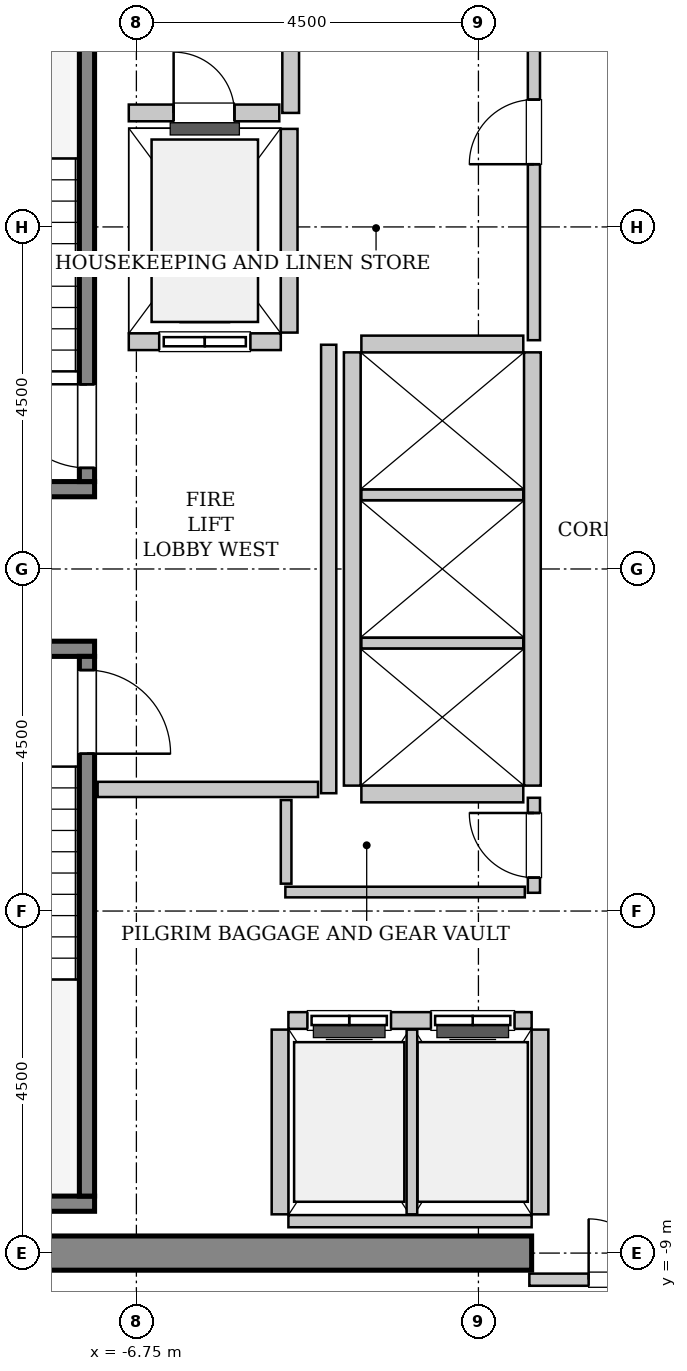
"""IFC4 building model, lengths in metres.
Left out: names, types, materials, properties, quantities, classifications, styles, units other than length and angle.
Written with IfcOpenShell. Run it as: python <this file> out.ifc"""

import sys

from ifc_helpers import new_model, si_unit, direction, frame, frame_2d, origin, place, context, subcontext, project, spatial, rectangle, extrude, source, transform, mapped, element, fill, save


model = new_model("IFC4")
c1 = context("Model", 3, precision=1e-05, world=origin(), true_north=direction((0.0, 1.0)))
c2 = subcontext(c1, "Body", "Model", "MODEL_VIEW")
j1 = project(units=[si_unit("LENGTHUNIT", "METRE"), si_unit("PLANEANGLEUNIT", "RADIAN")], contexts=[c1])
p1 = place(None, origin())
s1 = spatial("IfcSite", under=j1, at=p1, CompositionType="ELEMENT")
p2 = place(p1, origin())
s2 = spatial("IfcBuilding", under=s1, at=p2, CompositionType="ELEMENT")
p3 = place(p2, frame((0.0, 0.0, 210.4)))
s3 = spatial("IfcBuildingStorey", under=s2, at=p3, CompositionType="ELEMENT", Elevation=210.4)
m1 = source(origin(), c2, "Body", "SweptSolid", [
    extrude(rectangle(XDim=9.925, YDim=0.45, at=frame_2d((4.962, 0.0))), origin(), (0.0, 0.0, 1.0), 3.8),
])
p4 = place(p3, frame((-11.475, -9.0, 0.0), z_axis=(0.0, 0.0, 1.0), x_axis=(1.0, 0.0, 0.0)))
e1 = element("IfcWall", 1, at=p4, inside=s3, PredefinedType="SHEAR", context=c2, shape_type="MappedRepresentation", body=[
    mapped(m1, transform((0.0, 0.0, 0.0), x_axis=(1.0, 0.0, 0.0), y_axis=(0.0, 1.0, 0.0), z_axis=(0.0, 0.0, 1.0), scale=1.0)),
])
m2 = source(origin(), c2, "Body", "SweptSolid", [
    extrude(rectangle(XDim=3.4, YDim=0.2, at=frame_2d((1.7, 0.0))), origin(), (0.0, 0.0, 1.0), 3.8),
])
p5 = place(p3, frame((-7.3, 1.05, 0.0), z_axis=(0.0, 0.0, 1.0), x_axis=(-1.0, 0.0, 0.0)))
e2 = element("IfcWall", 2, at=p5, inside=s3, PredefinedType="SOLIDWALL", context=c2, shape_type="MappedRepresentation", body=[
    mapped(m2, transform((0.0, 0.0, 0.0), x_axis=(1.0, 0.0, 0.0), y_axis=(0.0, 1.0, 0.0), z_axis=(0.0, 0.0, 1.0), scale=1.0)),
])
m3 = source(origin(), c2, "Body", "SweptSolid", [
    extrude(rectangle(XDim=7.1, YDim=0.2, at=frame_2d((3.55, 0.0))), origin(), (0.0, 0.0, 1.0), 3.8),
])
p6 = place(p3, frame((-7.4, 1.15, 0.0), z_axis=(0.0, 0.0, 1.0), x_axis=(0.0, 1.0, 0.0)))
e3 = element("IfcWall", 3, at=p6, inside=s3, PredefinedType="SOLIDWALL", context=c2, shape_type="MappedRepresentation", body=[
    mapped(m3, transform((0.0, 0.0, 0.0), x_axis=(1.0, 0.0, 0.0), y_axis=(0.0, 1.0, 0.0), z_axis=(0.0, 0.0, 1.0), scale=1.0)),
])
p7 = place(p6, frame((0.18, 0.0, 0.0)))
e4 = element("IfcOpeningElement", 4, at=p7, cuts=e3, PredefinedType="OPENING", context=c2, shape_type="SweptSolid", body=[
    extrude(rectangle(XDim=1.1, YDim=2.15, at=frame_2d((0.55, 1.075))), frame((0.0, 0.11, 0.0), z_axis=(0.0, -1.0, 0.0), x_axis=(1.0, 0.0, 0.0)), (0.0, 0.0, 1.0), 0.22),
])
p8 = place(p3, frame((-10.7, -1.05, 0.0), z_axis=(0.0, 0.0, 1.0), x_axis=(1.0, 0.0, 0.0)))
e5 = element("IfcWall", 5, at=p8, inside=s3, PredefinedType="SOLIDWALL", context=c2, shape_type="MappedRepresentation", body=[
    mapped(m2, transform((0.0, 0.0, 0.0), x_axis=(1.0, 0.0, 0.0), y_axis=(0.0, 1.0, 0.0), z_axis=(0.0, 0.0, 1.0), scale=1.0)),
])
m4 = source(origin(), c2, "Body", "SweptSolid", [
    extrude(rectangle(XDim=3.73, YDim=0.2, at=frame_2d((1.865, 0.0))), origin(), (0.0, 0.0, 1.0), 3.8),
])
p9 = place(p3, frame((-11.03, -8.35, 0.0), z_axis=(0.0, 0.0, 1.0), x_axis=(1.0, 0.0, 0.0)))
e6 = element("IfcWall", 6, at=p9, inside=s3, PredefinedType="SOLIDWALL", context=c2, shape_type="MappedRepresentation", body=[
    mapped(m4, transform((0.0, 0.0, 0.0), x_axis=(1.0, 0.0, 0.0), y_axis=(0.0, 1.0, 0.0), z_axis=(0.0, 0.0, 1.0), scale=1.0)),
])
p10 = place(p3, frame((-7.4, -1.15, 0.0), z_axis=(0.0, 0.0, 1.0), x_axis=(0.0, -1.0, 0.0)))
e7 = element("IfcWall", 7, at=p10, inside=s3, PredefinedType="SOLIDWALL", context=c2, shape_type="MappedRepresentation", body=[
    mapped(m3, transform((0.0, 0.0, 0.0), x_axis=(1.0, 0.0, 0.0), y_axis=(0.0, 1.0, 0.0), z_axis=(0.0, 0.0, 1.0), scale=1.0)),
])
p11 = place(p10, frame((0.18, 0.0, 0.0)))
e8 = element("IfcOpeningElement", 8, at=p11, cuts=e7, PredefinedType="OPENING", context=c2, shape_type="SweptSolid", body=[
    extrude(rectangle(XDim=1.1, YDim=2.15, at=frame_2d((0.55, 1.075))), frame((0.0, 0.11, 0.0), z_axis=(0.0, -1.0, 0.0), x_axis=(1.0, 0.0, 0.0)), (0.0, 0.0, 1.0), 0.22),
])
m5 = source(origin(), c2, "Body", "SweptSolid", [
    extrude(rectangle(XDim=2.0, YDim=0.22, at=frame_2d((1.0, 0.0))), origin(), (0.0, 0.0, 1.0), 3.535),
])
p12 = place(p3, frame((-6.85, 2.99, 0.0), z_axis=(0.0, 0.0, 1.0), x_axis=(1.0, 0.0, 0.0)))
e9 = element("IfcWall", 9, at=p12, inside=s3, PredefinedType="SOLIDWALL", context=c2, shape_type="MappedRepresentation", body=[
    mapped(m5, transform((0.0, 0.0, 0.0), x_axis=(1.0, 0.0, 0.0), y_axis=(0.0, 1.0, 0.0), z_axis=(0.0, 0.0, 1.0), scale=1.0)),
])
p13 = place(p12, frame((0.4, 0.0, 0.0)))
e10 = element("IfcOpeningElement", 10, at=p13, cuts=e9, PredefinedType="OPENING", context=c2, shape_type="SweptSolid", body=[
    extrude(rectangle(XDim=1.2, YDim=2.2, at=frame_2d((0.6, 1.1))), frame((0.0, 0.12, 0.0), z_axis=(0.0, -1.0, 0.0), x_axis=(1.0, 0.0, 0.0)), (0.0, 0.0, 1.0), 0.24),
])
m6 = source(origin(), c2, "Body", "SweptSolid", [
    extrude(rectangle(XDim=2.68, YDim=0.22, at=frame_2d((1.34, 0.0))), origin(), (0.0, 0.0, 1.0), 3.535),
])
p14 = place(p3, frame((-4.74, 3.11, 0.0), z_axis=(0.0, 0.0, 1.0), x_axis=(0.0, 1.0, 0.0)))
e11 = element("IfcWall", 11, at=p14, inside=s3, PredefinedType="SOLIDWALL", context=c2, shape_type="MappedRepresentation", body=[
    mapped(m6, transform((0.0, 0.0, 0.0), x_axis=(1.0, 0.0, 0.0), y_axis=(0.0, 1.0, 0.0), z_axis=(0.0, 0.0, 1.0), scale=1.0)),
])
m7 = source(origin(), c2, "Body", "SweptSolid", [
    extrude(rectangle(XDim=3.2, YDim=0.22, at=frame_2d((1.6, 0.0))), origin(), (0.0, 0.0, 1.0), 3.535),
])
p15 = place(p3, frame((-1.55, -5.94, 0.0), z_axis=(0.0, 0.0, 1.0), x_axis=(-1.0, 0.0, 0.0)))
e12 = element("IfcWall", 12, at=p15, inside=s3, PredefinedType="SOLIDWALL", context=c2, shape_type="MappedRepresentation", body=[
    mapped(m7, transform((0.0, 0.0, 0.0), x_axis=(1.0, 0.0, 0.0), y_axis=(0.0, 1.0, 0.0), z_axis=(0.0, 0.0, 1.0), scale=1.0)),
])
p16 = place(p15, frame((1.85, 0.0, 0.0)))
e13 = element("IfcOpeningElement", 13, at=p16, cuts=e12, PredefinedType="OPENING", context=c2, shape_type="SweptSolid", body=[
    extrude(rectangle(XDim=1.1, YDim=2.2, at=frame_2d((0.55, 1.1))), frame((0.0, 0.12, 0.0), z_axis=(0.0, -1.0, 0.0), x_axis=(1.0, 0.0, 0.0)), (0.0, 0.0, 1.0), 0.24),
])
p17 = place(p15, frame((0.225, 0.0, 0.0)))
e14 = element("IfcOpeningElement", 14, at=p17, cuts=e12, PredefinedType="OPENING", context=c2, shape_type="SweptSolid", body=[
    extrude(rectangle(XDim=1.1, YDim=2.2, at=frame_2d((0.55, 1.1))), frame((0.0, 0.12, 0.0), z_axis=(0.0, -1.0, 0.0), x_axis=(1.0, 0.0, 0.0)), (0.0, 0.0, 1.0), 0.24),
])
m8 = source(origin(), c2, "Body", "SweptSolid", [
    extrude(rectangle(XDim=3.2, YDim=0.16, at=frame_2d((1.6, 0.0))), origin(), (0.0, 0.0, 1.0), 2.625),
])
p18 = place(p3, frame((-4.75, -8.58, 0.0), z_axis=(0.0, 0.0, 1.0), x_axis=(1.0, 0.0, 0.0)))
e15 = element("IfcWall", 15, at=p18, inside=s3, PredefinedType="PARTITIONING", context=c2, shape_type="MappedRepresentation", body=[
    mapped(m8, transform((0.0, 0.0, 0.0), x_axis=(1.0, 0.0, 0.0), y_axis=(0.0, 1.0, 0.0), z_axis=(0.0, 0.0, 1.0), scale=1.0)),
])
m9 = source(origin(), c2, "Body", "SweptSolid", [
    extrude(rectangle(XDim=2.43, YDim=0.22, at=frame_2d((1.215, 0.0))), origin(), (0.0, 0.0, 1.0), 3.535),
])
p19 = place(p3, frame((-4.86, -6.06, 0.0), z_axis=(0.0, 0.0, 1.0), x_axis=(0.0, -1.0, 0.0)))
e16 = element("IfcWall", 16, at=p19, inside=s3, PredefinedType="SOLIDWALL", context=c2, shape_type="MappedRepresentation", body=[
    mapped(m9, transform((0.0, 0.0, 0.0), x_axis=(1.0, 0.0, 0.0), y_axis=(0.0, 1.0, 0.0), z_axis=(0.0, 0.0, 1.0), scale=1.0)),
])
m10 = source(origin(), c2, "Body", "SweptSolid", [
    extrude(rectangle(XDim=2.43, YDim=0.14, at=frame_2d((1.215, 0.0))), origin(), (0.0, 0.0, 1.0), 3.535),
])
p20 = place(p3, frame((-3.125, -8.49, 0.0), z_axis=(0.0, 0.0, 1.0), x_axis=(0.0, 1.0, 0.0)))
e17 = element("IfcWall", 17, at=p20, inside=s3, PredefinedType="PARTITIONING", context=c2, shape_type="MappedRepresentation", body=[
    mapped(m10, transform((0.0, 0.0, 0.0), x_axis=(1.0, 0.0, 0.0), y_axis=(0.0, 1.0, 0.0), z_axis=(0.0, 0.0, 1.0), scale=1.0)),
])
p21 = place(p3, frame((-1.44, -8.49, 0.0), z_axis=(0.0, 0.0, 1.0), x_axis=(0.0, 1.0, 0.0)))
e18 = element("IfcWall", 18, at=p21, inside=s3, PredefinedType="SOLIDWALL", context=c2, shape_type="MappedRepresentation", body=[
    mapped(m9, transform((0.0, 0.0, 0.0), x_axis=(1.0, 0.0, 0.0), y_axis=(0.0, 1.0, 0.0), z_axis=(0.0, 0.0, 1.0), scale=1.0)),
])
m11 = source(origin(), c2, "Body", "SweptSolid", [
    extrude(rectangle(XDim=5.7, YDim=0.22, at=frame_2d((2.85, 0.0))), origin(), (0.0, 0.0, 1.0), 3.535),
])
for number, where, z_axis, x_axis in (
    (19, (-1.54, -2.85, 0.0), (0.0, 0.0, 1.0), (0.0, 1.0, 0.0)),
    (20, (-3.91, 2.85, 0.0), (0.0, 0.0, 1.0), (0.0, -1.0, 0.0)),
):
    element("IfcWall", number, at=place(p3, frame(where, z_axis=z_axis, x_axis=x_axis)), inside=s3, PredefinedType="SOLIDWALL", context=c2, shape_type="MappedRepresentation", body=[
        mapped(m11, transform((0.0, 0.0, 0.0), x_axis=(1.0, 0.0, 0.0), y_axis=(0.0, 1.0, 0.0), z_axis=(0.0, 0.0, 1.0), scale=1.0)),
    ])
m12 = source(origin(), c2, "Body", "SweptSolid", [
    extrude(rectangle(XDim=2.13, YDim=0.22, at=frame_2d((1.065, 0.0))), origin(), (0.0, 0.0, 1.0), 3.535),
])
p22 = place(p3, frame((-3.79, -2.96, 0.0), z_axis=(0.0, 0.0, 1.0), x_axis=(1.0, 0.0, 0.0)))
e21 = element("IfcWall", 21, at=p22, inside=s3, PredefinedType="SOLIDWALL", context=c2, shape_type="MappedRepresentation", body=[
    mapped(m12, transform((0.0, 0.0, 0.0), x_axis=(1.0, 0.0, 0.0), y_axis=(0.0, 1.0, 0.0), z_axis=(0.0, 0.0, 1.0), scale=1.0)),
])
m13 = source(origin(), c2, "Body", "SweptSolid", [
    extrude(rectangle(XDim=2.13, YDim=0.14, at=frame_2d((1.065, 0.0))), origin(), (0.0, 0.0, 1.0), 3.535),
])
for number, where, z_axis, x_axis in (
    (22, (-3.79, -0.975, 0.0), (0.0, 0.0, 1.0), (1.0, 0.0, 0.0)),
    (23, (-3.79, 0.975, 0.0), (0.0, 0.0, 1.0), (1.0, 0.0, 0.0)),
):
    element("IfcWall", number, at=place(p3, frame(where, z_axis=z_axis, x_axis=x_axis)), inside=s3, PredefinedType="PARTITIONING", context=c2, shape_type="MappedRepresentation", body=[
        mapped(m13, transform((0.0, 0.0, 0.0), x_axis=(1.0, 0.0, 0.0), y_axis=(0.0, 1.0, 0.0), z_axis=(0.0, 0.0, 1.0), scale=1.0)),
    ])
p23 = place(p3, frame((-1.66, 2.96, 0.0), z_axis=(0.0, 0.0, 1.0), x_axis=(-1.0, 0.0, 0.0)))
e24 = element("IfcWall", 24, at=p23, inside=s3, PredefinedType="SOLIDWALL", context=c2, shape_type="MappedRepresentation", body=[
    mapped(m12, transform((0.0, 0.0, 0.0), x_axis=(1.0, 0.0, 0.0), y_axis=(0.0, 1.0, 0.0), z_axis=(0.0, 0.0, 1.0), scale=1.0)),
])
m14 = source(origin(), c2, "Body", "SweptSolid", [
    extrude(rectangle(XDim=2.25, YDim=0.22, at=frame_2d((1.125, 0.0))), origin(), (0.0, 0.0, 1.0), 3.535),
])
p24 = place(p3, frame((-4.72, 6.0, 0.0), z_axis=(0.0, 0.0, 1.0), x_axis=(0.0, 1.0, 0.0)))
e25 = element("IfcWall", 25, at=p24, inside=s3, PredefinedType="SOLIDWALL", context=c2, shape_type="MappedRepresentation", body=[
    mapped(m14, transform((0.0, 0.0, 0.0), x_axis=(1.0, 0.0, 0.0), y_axis=(0.0, 1.0, 0.0), z_axis=(0.0, 0.0, 1.0), scale=1.0)),
])
m15 = source(origin(), c2, "Body", "SweptSolid", [
    extrude(rectangle(XDim=1.98, YDim=0.22, at=frame_2d((0.99, 0.0))), origin(), (0.0, 0.0, 1.0), 3.535),
])
p25 = place(p3, frame((-6.85, 6.0, 0.0), z_axis=(0.0, 0.0, 1.0), x_axis=(1.0, 0.0, 0.0)))
e26 = element("IfcWall", 26, at=p25, inside=s3, PredefinedType="SOLIDWALL", context=c2, shape_type="MappedRepresentation", body=[
    mapped(m15, transform((0.0, 0.0, 0.0), x_axis=(1.0, 0.0, 0.0), y_axis=(0.0, 1.0, 0.0), z_axis=(0.0, 0.0, 1.0), scale=1.0)),
])
p26 = place(p25, frame((0.59, 0.0, 0.0)))
e27 = element("IfcOpeningElement", 27, at=p26, cuts=e26, PredefinedType="OPENING", context=c2, shape_type="SweptSolid", body=[
    extrude(rectangle(XDim=0.8, YDim=2.0, at=frame_2d((0.4, 1.0))), frame((0.0, 0.12, 0.0), z_axis=(0.0, -1.0, 0.0), x_axis=(1.0, 0.0, 0.0)), (0.0, 0.0, 1.0), 0.24),
])
m16 = source(origin(), c2, "Body", "SweptSolid", [
    extrude(rectangle(XDim=5.9, YDim=0.2, at=frame_2d((2.95, 0.0))), origin(), (0.0, 0.0, 1.0), 3.535),
])
p27 = place(p3, frame((-4.22, -2.95, 0.0), z_axis=(0.0, 0.0, 1.0), x_axis=(0.0, 1.0, 0.0)))
e28 = element("IfcWall", 28, at=p27, inside=s3, PredefinedType="PARTITIONING", context=c2, shape_type="MappedRepresentation", body=[
    mapped(m16, transform((0.0, 0.0, 0.0), x_axis=(1.0, 0.0, 0.0), y_axis=(0.0, 1.0, 0.0), z_axis=(0.0, 0.0, 1.0), scale=1.0)),
])
m17 = source(origin(), c2, "Body", "SweptSolid", [
    extrude(rectangle(XDim=2.9, YDim=0.2, at=frame_2d((1.45, 0.0))), origin(), (0.0, 0.0, 1.0), 3.535),
])
p28 = place(p3, frame((-7.26, -2.9, 0.0), z_axis=(0.0, 0.0, 1.0), x_axis=(1.0, 0.0, 0.0)))
e29 = element("IfcWall", 29, at=p28, inside=s3, PredefinedType="PARTITIONING", context=c2, shape_type="MappedRepresentation", body=[
    mapped(m17, transform((0.0, 0.0, 0.0), x_axis=(1.0, 0.0, 0.0), y_axis=(0.0, 1.0, 0.0), z_axis=(0.0, 0.0, 1.0), scale=1.0)),
])
m18 = source(origin(), c2, "Body", "SweptSolid", [
    extrude(rectangle(XDim=3.16, YDim=0.16, at=frame_2d((1.58, 0.0))), origin(), (0.0, 0.0, 1.0), 2.625),
])
p29 = place(p3, frame((-1.58, -9.35, 0.0), z_axis=(0.0, 0.0, 1.0), x_axis=(1.0, 0.0, 0.0)))
e30 = element("IfcWall", 30, at=p29, inside=s3, PredefinedType="PARTITIONING", context=c2, shape_type="MappedRepresentation", body=[
    mapped(m18, transform((0.0, 0.0, 0.0), x_axis=(1.0, 0.0, 0.0), y_axis=(0.0, 1.0, 0.0), z_axis=(0.0, 0.0, 1.0), scale=1.0)),
])
p30 = place(p29, frame((0.78, 0.0, 0.0)))
e31 = element("IfcOpeningElement", 31, at=p30, cuts=e30, PredefinedType="OPENING", context=c2, shape_type="SweptSolid", body=[
    extrude(rectangle(XDim=1.6, YDim=2.3, at=frame_2d((0.8, 1.15))), frame((0.0, 0.09, 0.0), z_axis=(0.0, -1.0, 0.0), x_axis=(1.0, 0.0, 0.0)), (0.0, 0.0, 1.0), 0.18),
])
m19 = source(origin(), c2, "Body", "SweptSolid", [
    extrude(rectangle(XDim=5.48, YDim=0.16, at=frame_2d((2.74, 0.0))), origin(), (0.0, 0.0, 1.0), 3.535),
])
p31 = place(p3, frame((-1.52, 3.01, 0.0), z_axis=(0.0, 0.0, 1.0), x_axis=(0.0, 1.0, 0.0)))
e32 = element("IfcWall", 32, at=p31, inside=s3, PredefinedType="PARTITIONING", context=c2, shape_type="MappedRepresentation", body=[
    mapped(m19, transform((0.0, 0.0, 0.0), x_axis=(1.0, 0.0, 0.0), y_axis=(0.0, 1.0, 0.0), z_axis=(0.0, 0.0, 1.0), scale=1.0)),
])
p32 = place(p31, frame((2.315, 0.0, 0.0)))
e33 = element("IfcOpeningElement", 33, at=p32, cuts=e32, PredefinedType="OPENING", context=c2, shape_type="SweptSolid", body=[
    extrude(rectangle(XDim=0.85, YDim=2.1, at=frame_2d((0.425, 1.05))), frame((0.0, 0.09, 0.0), z_axis=(0.0, -1.0, 0.0), x_axis=(1.0, 0.0, 0.0)), (0.0, 0.0, 1.0), 0.18),
])
m20 = source(origin(), c2, "Body", "SweptSolid", [
    extrude(rectangle(XDim=1.25, YDim=0.16, at=frame_2d((0.625, 0.0))), origin(), (0.0, 0.0, 1.0), 3.535),
])
p33 = place(p3, frame((-1.52, -4.26, 0.0), z_axis=(0.0, 0.0, 1.0), x_axis=(0.0, 1.0, 0.0)))
e34 = element("IfcWall", 34, at=p33, inside=s3, PredefinedType="PARTITIONING", context=c2, shape_type="MappedRepresentation", body=[
    mapped(m20, transform((0.0, 0.0, 0.0), x_axis=(1.0, 0.0, 0.0), y_axis=(0.0, 1.0, 0.0), z_axis=(0.0, 0.0, 1.0), scale=1.0)),
])
p34 = place(p33, frame((0.2, 0.0, 0.0)))
e35 = element("IfcOpeningElement", 35, at=p34, cuts=e34, PredefinedType="OPENING", context=c2, shape_type="SweptSolid", body=[
    extrude(rectangle(XDim=0.85, YDim=2.1, at=frame_2d((0.425, 1.05))), frame((0.0, 0.09, 0.0), z_axis=(0.0, -1.0, 0.0), x_axis=(1.0, 0.0, 0.0)), (0.0, 0.0, 1.0), 0.18),
])
m21 = source(origin(), c2, "Body", "SweptSolid", [
    extrude(rectangle(XDim=3.15, YDim=0.14, at=frame_2d((1.575, 0.0))), origin(), (0.0, 0.0, 1.0), 3.535),
])
p35 = place(p3, frame((-4.79, -4.25, 0.0), z_axis=(0.0, 0.0, 1.0), x_axis=(1.0, 0.0, 0.0)))
e36 = element("IfcWall", 36, at=p35, inside=s3, PredefinedType="PARTITIONING", context=c2, shape_type="MappedRepresentation", body=[
    mapped(m21, transform((0.0, 0.0, 0.0), x_axis=(1.0, 0.0, 0.0), y_axis=(0.0, 1.0, 0.0), z_axis=(0.0, 0.0, 1.0), scale=1.0)),
])
m22 = source(origin(), c2, "Body", "SweptSolid", [
    extrude(rectangle(XDim=1.1, YDim=0.14, at=frame_2d((0.55, 0.0))), origin(), (0.0, 0.0, 1.0), 3.535),
])
p36 = place(p3, frame((-4.78, -4.14, 0.0), z_axis=(0.0, 0.0, 1.0), x_axis=(0.0, 1.0, 0.0)))
e37 = element("IfcWall", 37, at=p36, inside=s3, PredefinedType="PARTITIONING", context=c2, shape_type="MappedRepresentation", body=[
    mapped(m22, transform((0.0, 0.0, 0.0), x_axis=(1.0, 0.0, 0.0), y_axis=(0.0, 1.0, 0.0), z_axis=(0.0, 0.0, 1.0), scale=1.0)),
])
m23 = source(origin(), c2, "Body", "SweptSolid", [
    extrude(rectangle(XDim=1.1, YDim=2.15, at=frame_2d((0.55, 1.075))), frame((0.0, 0.025, 0.0), z_axis=(0.0, -1.0, 0.0), x_axis=(1.0, 0.0, 0.0)), (0.0, 0.0, 1.0), 0.05),
])
p37 = place(p7, origin())
e38 = element("IfcDoor", 38, at=p37, inside=s3, OperationType="SINGLE_SWING_RIGHT", PredefinedType="DOOR", context=c2, shape_type="MappedRepresentation", body=[
    mapped(m23, transform((0.0, 0.0, 0.0), x_axis=(1.0, 0.0, 0.0), y_axis=(0.0, 1.0, 0.0), z_axis=(0.0, 0.0, 1.0), scale=1.0)),
])
fill(e4, e38)
p38 = place(p11, origin())
e39 = element("IfcDoor", 39, at=p38, inside=s3, OperationType="SINGLE_SWING_RIGHT", PredefinedType="DOOR", context=c2, shape_type="MappedRepresentation", body=[
    mapped(m23, transform((0.0, 0.0, 0.0), x_axis=(1.0, 0.0, 0.0), y_axis=(0.0, 1.0, 0.0), z_axis=(0.0, 0.0, 1.0), scale=1.0)),
])
fill(e8, e39)
m24 = source(origin(), c2, "Body", "SweptSolid", [
    extrude(rectangle(XDim=1.2, YDim=2.2, at=frame_2d((0.6, 1.1))), frame((0.0, 0.025, 0.0), z_axis=(0.0, -1.0, 0.0), x_axis=(1.0, 0.0, 0.0)), (0.0, 0.0, 1.0), 0.05),
])
p39 = place(p13, origin())
e40 = element("IfcDoor", 40, at=p39, inside=s3, OperationType="SLIDING_TO_LEFT", PredefinedType="DOOR", context=c2, shape_type="MappedRepresentation", body=[
    mapped(m24, transform((0.0, 0.0, 0.0), x_axis=(1.0, 0.0, 0.0), y_axis=(0.0, 1.0, 0.0), z_axis=(0.0, 0.0, 1.0), scale=1.0)),
])
fill(e10, e40)
m25 = source(origin(), c2, "Body", "SweptSolid", [
    extrude(rectangle(XDim=1.1, YDim=2.2, at=frame_2d((0.55, 1.1))), frame((0.0, 0.025, 0.0), z_axis=(0.0, -1.0, 0.0), x_axis=(1.0, 0.0, 0.0)), (0.0, 0.0, 1.0), 0.05),
])
p40 = place(p16, origin())
e41 = element("IfcDoor", 41, at=p40, inside=s3, OperationType="DOUBLE_DOOR_SLIDING", PredefinedType="DOOR", context=c2, shape_type="MappedRepresentation", body=[
    mapped(m25, transform((0.0, 0.0, 0.0), x_axis=(1.0, 0.0, 0.0), y_axis=(0.0, 1.0, 0.0), z_axis=(0.0, 0.0, 1.0), scale=1.0)),
])
fill(e13, e41)
p41 = place(p17, origin())
e42 = element("IfcDoor", 42, at=p41, inside=s3, OperationType="DOUBLE_DOOR_SLIDING", PredefinedType="DOOR", context=c2, shape_type="MappedRepresentation", body=[
    mapped(m25, transform((0.0, 0.0, 0.0), x_axis=(1.0, 0.0, 0.0), y_axis=(0.0, 1.0, 0.0), z_axis=(0.0, 0.0, 1.0), scale=1.0)),
])
fill(e14, e42)
m26 = source(origin(), c2, "Body", "SweptSolid", [
    extrude(rectangle(XDim=0.8, YDim=2.0, at=frame_2d((0.4, 1.0))), frame((0.0, 0.025, 0.0), z_axis=(0.0, -1.0, 0.0), x_axis=(1.0, 0.0, 0.0)), (0.0, 0.0, 1.0), 0.05),
])
p42 = place(p26, origin())
e43 = element("IfcDoor", 43, at=p42, inside=s3, OperationType="SINGLE_SWING_LEFT", PredefinedType="TRAPDOOR", context=c2, shape_type="MappedRepresentation", body=[
    mapped(m26, transform((0.0, 0.0, 0.0), x_axis=(1.0, 0.0, 0.0), y_axis=(0.0, 1.0, 0.0), z_axis=(0.0, 0.0, 1.0), scale=1.0)),
])
fill(e27, e43)
m27 = source(origin(), c2, "Body", "SweptSolid", [
    extrude(rectangle(XDim=1.6, YDim=2.3, at=frame_2d((0.8, 1.15))), frame((0.0, 0.025, 0.0), z_axis=(0.0, -1.0, 0.0), x_axis=(1.0, 0.0, 0.0)), (0.0, 0.0, 1.0), 0.05),
])
p43 = place(p30, origin())
e44 = element("IfcDoor", 44, at=p43, inside=s3, OperationType="DOUBLE_DOOR_SINGLE_SWING", PredefinedType="DOOR", context=c2, shape_type="MappedRepresentation", body=[
    mapped(m27, transform((0.0, 0.0, 0.0), x_axis=(1.0, 0.0, 0.0), y_axis=(0.0, 1.0, 0.0), z_axis=(0.0, 0.0, 1.0), scale=1.0)),
])
fill(e31, e44)
m28 = source(origin(), c2, "Body", "SweptSolid", [
    extrude(rectangle(XDim=0.85, YDim=2.1, at=frame_2d((0.425, 1.05))), frame((0.0, 0.025, 0.0), z_axis=(0.0, -1.0, 0.0), x_axis=(1.0, 0.0, 0.0)), (0.0, 0.0, 1.0), 0.05),
])
p44 = place(p32, origin())
e45 = element("IfcDoor", 45, at=p44, inside=s3, OperationType="SINGLE_SWING_LEFT", PredefinedType="DOOR", context=c2, shape_type="MappedRepresentation", body=[
    mapped(m28, transform((0.0, 0.0, 0.0), x_axis=(1.0, 0.0, 0.0), y_axis=(0.0, 1.0, 0.0), z_axis=(0.0, 0.0, 1.0), scale=1.0)),
])
fill(e33, e45)
p45 = place(p34, origin())
e46 = element("IfcDoor", 46, at=p45, inside=s3, OperationType="SINGLE_SWING_RIGHT", PredefinedType="DOOR", context=c2, shape_type="MappedRepresentation", body=[
    mapped(m28, transform((0.0, 0.0, 0.0), x_axis=(1.0, 0.0, 0.0), y_axis=(0.0, 1.0, 0.0), z_axis=(0.0, 0.0, 1.0), scale=1.0)),
])
fill(e35, e46)
save(model, sys.argv[1])
